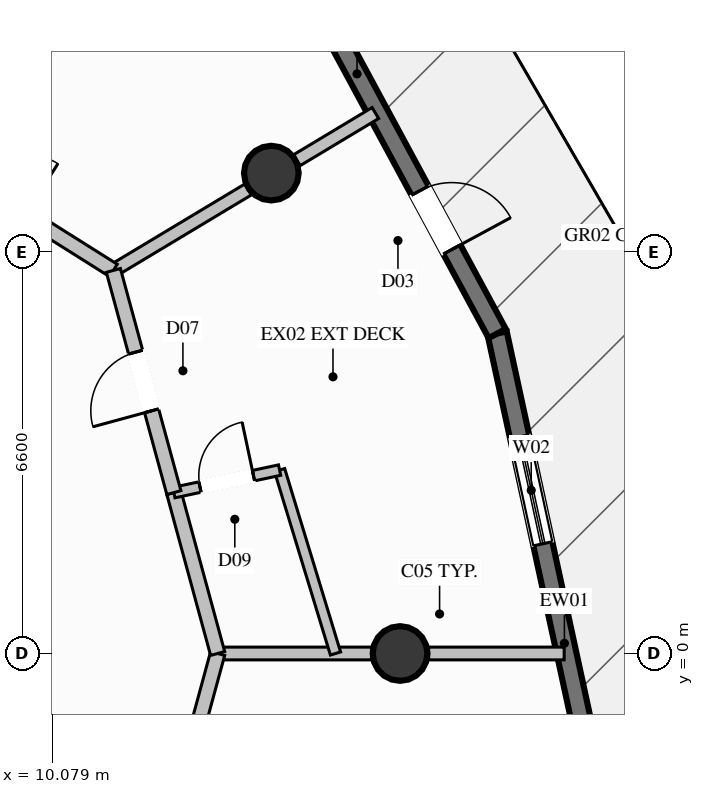
"""IFC4 building model, lengths in metres.
Left out: names, types, materials, properties, quantities, classifications, styles, units other than length and angle.
Written with IfcOpenShell. Run it as: python <this file> out.ifc"""

import sys

from ifc_helpers import new_model, si_unit, direction, frame, frame_2d, origin, origin_2d, place, context, subcontext, project, spatial, rectangle, circle, extrude, element, fill, save


model = new_model("IFC4")
c1 = context("Model", 3, precision=1e-05, world=origin(), true_north=direction((0.0, 1.0)))
c2 = subcontext(c1, "Body", "Model", "MODEL_VIEW")
j1 = project(units=[si_unit("LENGTHUNIT", "METRE"), si_unit("PLANEANGLEUNIT", "RADIAN")], contexts=[c1])
p1 = place(None, origin())
s1 = spatial("IfcSite", under=j1, at=p1, CompositionType="ELEMENT")
p2 = place(p1, origin())
s2 = spatial("IfcBuilding", under=s1, at=p2, CompositionType="ELEMENT")
p3 = place(p2, frame((0.0, 0.0, 173.2)))
s3 = spatial("IfcBuildingStorey", under=s2, at=p3, CompositionType="ELEMENT", Elevation=173.2)
for number, where, z_axis, x_axis in (
    (1, (15.8, 0.0, 0.0), (0.0, 0.0, 1.0), (1.0, 0.0, 0.0)),
    (2, (13.683, 7.9, 0.0), (0.0, 0.0, 1.0), (1.0, 0.0, 0.0)),
):
    element("IfcColumn", number, at=place(p3, frame(where, z_axis=z_axis, x_axis=x_axis)), inside=s3, PredefinedType="COLUMN", context=c2, shape_type="SweptSolid", body=[
        extrude(circle(Radius=0.45, at=origin_2d()), origin(), (0.0, 0.0, 1.0), 3.6),
    ])
p4 = place(p3, frame((17.398, 5.262, 0.0), z_axis=(0.0, 0.0, 1.0), x_axis=(0.211992849193, -0.977271217161, 0.0)))
e3 = element("IfcWall", 3, at=p4, inside=s3, PredefinedType="SOLIDWALL", context=c2, shape_type="SweptSolid", body=[
    extrude(rectangle(XDim=6.637, YDim=0.32, at=frame_2d((3.318, 0.0))), origin(), (0.0, 0.0, 1.0), 3.36),
])
p5 = place(p4, frame((1.738, 0.0, 0.35)))
e4 = element("IfcOpeningElement", 4, at=p5, cuts=e3, PredefinedType="OPENING", context=c2, shape_type="SweptSolid", body=[
    extrude(rectangle(XDim=1.8, YDim=2.6, at=frame_2d((0.9, 1.3))), frame((0.0, 0.17, 0.0), z_axis=(0.0, -1.0, 0.0), x_axis=(1.0, 0.0, 0.0)), (0.0, 0.0, 1.0), 0.34),
])
p6 = place(p3, frame((14.174, 11.232, 0.0), z_axis=(0.0, 0.0, 1.0), x_axis=(0.475159501302, -0.879899680829, 0.0)))
e5 = element("IfcWall", 5, at=p6, inside=s3, PredefinedType="SOLIDWALL", context=c2, shape_type="SweptSolid", body=[
    extrude(rectangle(XDim=6.785, YDim=0.32, at=frame_2d((3.393, 0.0))), origin(), (0.0, 0.0, 1.0), 3.36),
])
p7 = place(p6, frame((4.114, 0.0, 0.0)))
e6 = element("IfcOpeningElement", 6, at=p7, cuts=e5, PredefinedType="OPENING", context=c2, shape_type="SweptSolid", body=[
    extrude(rectangle(XDim=1.1, YDim=2.2, at=frame_2d((0.55, 1.1))), frame((0.0, 0.17, 0.0), z_axis=(0.0, -1.0, 0.0), x_axis=(1.0, 0.0, 0.0)), (0.0, 0.0, 1.0), 0.34),
])
p8 = place(p3, frame((12.8, 0.0, 0.0), z_axis=(0.0, 0.0, 1.0), x_axis=(1.0, 0.0, 0.0)))
e7 = element("IfcWall", 7, at=p8, inside=s3, PredefinedType="PARTITIONING", context=c2, shape_type="SweptSolid", body=[
    extrude(rectangle(XDim=2.53, YDim=0.21, at=frame_2d((1.265, 0.0))), origin(), (0.0, 0.0, 1.0), 3.36),
])
p9 = place(p3, frame((16.27, 0.0, 0.0), z_axis=(0.0, 0.0, 1.0), x_axis=(1.0, 0.0, 0.0)))
e8 = element("IfcWall", 8, at=p9, inside=s3, PredefinedType="PARTITIONING", context=c2, shape_type="SweptSolid", body=[
    extrude(rectangle(XDim=2.229, YDim=0.21, at=frame_2d((1.115, 0.0))), origin(), (0.0, 0.0, 1.0), 3.36),
])
p10 = place(p3, frame((11.085, 6.3, 0.0), z_axis=(0.0, 0.0, 1.0), x_axis=(0.857259301733, 0.514884928497, 0.0)))
e9 = element("IfcWall", 9, at=p10, inside=s3, PredefinedType="PARTITIONING", context=c2, shape_type="SweptSolid", body=[
    extrude(rectangle(XDim=2.583, YDim=0.21, at=frame_2d((1.292, 0.0))), origin(), (0.0, 0.0, 1.0), 2.801),
])
p11 = place(p3, frame((14.102, 8.112, 0.0), z_axis=(0.0, 0.0, 1.0), x_axis=(0.85729274583, 0.514829241543, 0.0)))
e10 = element("IfcWall", 10, at=p11, inside=s3, PredefinedType="PARTITIONING", context=c2, shape_type="SweptSolid", body=[
    extrude(rectangle(XDim=1.507, YDim=0.21, at=frame_2d((0.753, 0.0))), origin(), (0.0, 0.0, 1.0), 3.36),
])
p12 = place(p3, frame((7.35, 8.65, 0.0), z_axis=(0.0, 0.0, 1.0), x_axis=(0.846409267484, -0.532532958526, 0.0)))
e11 = element("IfcWall", 11, at=p12, inside=s3, PredefinedType="PARTITIONING", context=c2, shape_type="SweptSolid", body=[
    extrude(rectangle(XDim=4.413, YDim=0.24, at=frame_2d((2.206, 0.0))), origin(), (0.0, 0.0, 1.0), 3.36),
])
p13 = place(p12, frame((1.706, 0.0, 0.0)))
e12 = element("IfcOpeningElement", 12, at=p13, cuts=e11, PredefinedType="OPENING", context=c2, shape_type="SweptSolid", body=[
    extrude(rectangle(XDim=1.0, YDim=2.2, at=frame_2d((0.5, 1.1))), frame((0.0, 0.13, 0.0), z_axis=(0.0, -1.0, 0.0), x_axis=(1.0, 0.0, 0.0)), (0.0, 0.0, 1.0), 0.26),
])
p14 = place(p3, frame((11.805, -3.654, 0.0), z_axis=(0.0, 0.0, 1.0), x_axis=(0.262762825819, 0.964860454868, 0.0)))
e13 = element("IfcWall", 13, at=p14, inside=s3, PredefinedType="PARTITIONING", context=c2, shape_type="SweptSolid", body=[
    extrude(rectangle(XDim=3.787, YDim=0.24, at=frame_2d((1.894, 0.0))), origin(), (0.0, 0.0, 1.0), 3.36),
])
p15 = place(p14, frame((1.394, 0.0, 0.0)))
e14 = element("IfcOpeningElement", 14, at=p15, cuts=e13, PredefinedType="OPENING", context=c2, shape_type="SweptSolid", body=[
    extrude(rectangle(XDim=1.0, YDim=2.2, at=frame_2d((0.5, 1.1))), frame((0.0, 0.13, 0.0), z_axis=(0.0, -1.0, 0.0), x_axis=(1.0, 0.0, 0.0)), (0.0, 0.0, 1.0), 0.26),
])
p16 = place(p3, frame((12.8, 0.0, 0.0), z_axis=(0.0, 0.0, 1.0), x_axis=(-0.262552356383, 0.964917747872, 0.0)))
e15 = element("IfcWall", 15, at=p16, inside=s3, PredefinedType="PARTITIONING", context=c2, shape_type="SweptSolid", body=[
    extrude(rectangle(XDim=2.742, YDim=0.24, at=frame_2d((1.371, 0.0))), origin(), (0.0, 0.0, 1.0), 3.36),
])
p17 = place(p3, frame((14.738, 0.0, 0.0), z_axis=(0.0, 0.0, 1.0), x_axis=(-0.291451232832, 0.956585688206, 0.0)))
e16 = element("IfcWall", 16, at=p17, inside=s3, PredefinedType="PLUMBINGWALL", context=c2, shape_type="SweptSolid", body=[
    extrude(rectangle(XDim=3.153, YDim=0.175, at=frame_2d((1.577, 0.0))), origin(), (0.0, 0.0, 1.0), 3.36),
])
p18 = place(p3, frame((12.08, 2.646, 0.0), z_axis=(0.0, 0.0, 1.0), x_axis=(0.978092843795, 0.208169135363, 0.0)))
e17 = element("IfcWall", 17, at=p18, inside=s3, PredefinedType="PLUMBINGWALL", context=c2, shape_type="SweptSolid", body=[
    extrude(rectangle(XDim=1.778, YDim=0.175, at=frame_2d((0.889, 0.0))), origin(), (0.0, 0.0, 1.0), 3.36),
])
p19 = place(p18, frame((0.439, 0.0, 0.0)))
e18 = element("IfcOpeningElement", 18, at=p19, cuts=e17, PredefinedType="OPENING", context=c2, shape_type="SweptSolid", body=[
    extrude(rectangle(XDim=0.9, YDim=2.1, at=frame_2d((0.45, 1.05))), frame((0.0, 0.098, 0.0), z_axis=(0.0, -1.0, 0.0), x_axis=(1.0, 0.0, 0.0)), (0.0, 0.0, 1.0), 0.195),
])
p20 = place(p3, frame((12.08, 2.646, 0.0), z_axis=(0.0, 0.0, 1.0), x_axis=(-0.262762825819, 0.964860454868, 0.0)))
e19 = element("IfcWall", 19, at=p20, inside=s3, PredefinedType="PARTITIONING", context=c2, shape_type="SweptSolid", body=[
    extrude(rectangle(XDim=3.787, YDim=0.24, at=frame_2d((1.894, 0.0))), origin(), (0.0, 0.0, 1.0), 3.36),
])
p21 = place(p20, frame((1.394, 0.0, 0.0)))
e20 = element("IfcOpeningElement", 20, at=p21, cuts=e19, PredefinedType="OPENING", context=c2, shape_type="SweptSolid", body=[
    extrude(rectangle(XDim=1.0, YDim=2.2, at=frame_2d((0.5, 1.1))), frame((0.0, 0.13, 0.0), z_axis=(0.0, -1.0, 0.0), x_axis=(1.0, 0.0, 0.0)), (0.0, 0.0, 1.0), 0.26),
])
p22 = place(p5, origin())
e21 = element("IfcWindow", 21, at=p22, inside=s3, PartitioningType="SINGLE_PANEL", PredefinedType="WINDOW", context=c2, shape_type="SweptSolid", body=[
    extrude(rectangle(XDim=1.8, YDim=2.6, at=frame_2d((0.9, 1.3))), frame((0.0, 0.03, 0.0), z_axis=(0.0, -1.0, 0.0), x_axis=(1.0, 0.0, 0.0)), (0.0, 0.0, 1.0), 0.06),
])
fill(e4, e21)
p23 = place(p7, origin())
e22 = element("IfcDoor", 22, at=p23, inside=s3, OperationType="SINGLE_SWING_RIGHT", PredefinedType="DOOR", context=c2, shape_type="SweptSolid", body=[
    extrude(rectangle(XDim=1.1, YDim=2.2, at=frame_2d((0.55, 1.1))), frame((0.0, 0.025, 0.0), z_axis=(0.0, -1.0, 0.0), x_axis=(1.0, 0.0, 0.0)), (0.0, 0.0, 1.0), 0.05),
])
fill(e6, e22)
p24 = place(p19, origin())
e23 = element("IfcDoor", 23, at=p24, inside=s3, OperationType="SINGLE_SWING_RIGHT", PredefinedType="DOOR", context=c2, shape_type="SweptSolid", body=[
    extrude(rectangle(XDim=0.9, YDim=2.1, at=frame_2d((0.45, 1.05))), frame((0.0, 0.025, 0.0), z_axis=(0.0, -1.0, 0.0), x_axis=(1.0, 0.0, 0.0)), (0.0, 0.0, 1.0), 0.05),
])
fill(e18, e23)
p25 = place(p21, origin())
e24 = element("IfcDoor", 24, at=p25, inside=s3, OperationType="SINGLE_SWING_LEFT", PredefinedType="DOOR", context=c2, shape_type="SweptSolid", body=[
    extrude(rectangle(XDim=1.0, YDim=2.2, at=frame_2d((0.5, 1.1))), frame((0.0, 0.025, 0.0), z_axis=(0.0, -1.0, 0.0), x_axis=(1.0, 0.0, 0.0)), (0.0, 0.0, 1.0), 0.05),
])
fill(e20, e24)
save(model, sys.argv[1])
